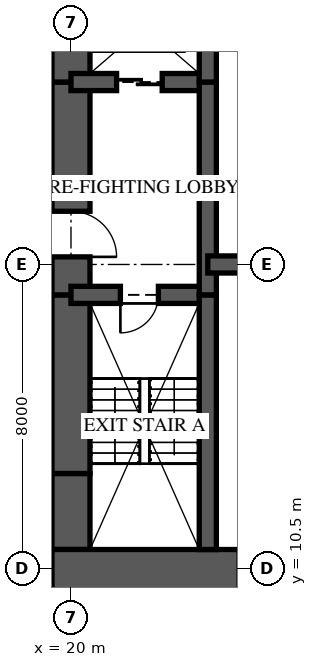
"""IFC4 building model, lengths in metres.
Left out: names, types, materials, properties, quantities, classifications, styles, units other than length and angle.
Written with IfcOpenShell. Run it as: python <this file> out.ifc"""

import sys

from ifc_helpers import new_model, si_unit, direction, frame, frame_2d, origin, place, context, subcontext, project, spatial, rectangle, extrude, element, fill, save


model = new_model("IFC4")
c1 = context("Model", 3, precision=1e-05, world=origin(), true_north=direction((0.0, 1.0)))
c2 = subcontext(c1, "Body", "Model", "MODEL_VIEW")
j1 = project(units=[si_unit("LENGTHUNIT", "METRE"), si_unit("PLANEANGLEUNIT", "RADIAN")], contexts=[c1])
p1 = place(None, origin())
s1 = spatial("IfcSite", under=j1, at=p1, CompositionType="ELEMENT")
p2 = place(p1, origin())
s2 = spatial("IfcBuilding", under=s1, at=p2, CompositionType="ELEMENT")
p3 = place(p2, frame((0.0, 0.0, 16.0)))
s3 = spatial("IfcBuildingStorey", under=s2, at=p3, CompositionType="ELEMENT", Elevation=16.0)
p4 = place(p3, frame((19.5, 10.125, 0.0), z_axis=(0.0, 0.0, 1.0), x_axis=(1.0, 0.0, 0.0)))
e1 = element("IfcWall", 1, at=p4, inside=s3, PredefinedType="SHEAR", context=c2, shape_type="SweptSolid", body=[
    extrude(rectangle(XDim=6.5, YDim=1.75, at=frame_2d((3.25, 0.0))), origin(), (0.0, 0.0, 1.0), 5.0),
])
p5 = place(p4, frame((4.925, 0.0, 0.0)))
e2 = element("IfcOpeningElement", 2, at=p5, cuts=e1, PredefinedType="OPENING", context=c2, shape_type="SweptSolid", body=[
    extrude(rectangle(XDim=0.75, YDim=2.1, at=frame_2d((0.375, 1.05))), frame((0.0, 0.885, 0.0), z_axis=(0.0, -1.0, 0.0), x_axis=(1.0, 0.0, 0.0)), (0.0, 0.0, 1.0), 1.77),
])
p6 = place(p3, frame((20.0, 26.0, 0.0), z_axis=(0.0, 0.0, 1.0), x_axis=(0.0, -1.0, 0.0)))
e3 = element("IfcWall", 3, at=p6, inside=s3, PredefinedType="SHEAR", context=c2, shape_type="SweptSolid", body=[
    extrude(rectangle(XDim=2.7, YDim=1.0, at=frame_2d((1.35, 0.0))), origin(), (0.0, 0.0, 1.0), 5.0),
])
p7 = place(p3, frame((20.0, 23.3, 0.0), z_axis=(0.0, 0.0, 1.0), x_axis=(0.0, -1.0, 0.0)))
e4 = element("IfcWall", 4, at=p7, inside=s3, PredefinedType="SHEAR", context=c2, shape_type="SweptSolid", body=[
    extrude(rectangle(XDim=5.6, YDim=1.0, at=frame_2d((2.8, 0.0))), origin(), (0.0, 0.0, 1.0), 5.0),
])
p8 = place(p7, frame((3.4, 0.0, 0.0)))
e5 = element("IfcOpeningElement", 5, at=p8, cuts=e4, PredefinedType="OPENING", context=c2, shape_type="SweptSolid", body=[
    extrude(rectangle(XDim=1.2, YDim=2.2, at=frame_2d((0.6, 1.1))), frame((0.0, 0.51, 0.0), z_axis=(0.0, -1.0, 0.0), x_axis=(1.0, 0.0, 0.0)), (0.0, 0.0, 1.0), 1.02),
])
p9 = place(p3, frame((20.0, 17.7, 0.0), z_axis=(0.0, 0.0, 1.0), x_axis=(0.0, -1.0, 0.0)))
e6 = element("IfcWall", 6, at=p9, inside=s3, PredefinedType="SHEAR", context=c2, shape_type="SweptSolid", body=[
    extrude(rectangle(XDim=4.7, YDim=1.0, at=frame_2d((2.35, 0.0))), origin(), (0.0, 0.0, 1.0), 5.0),
])
p10 = place(p3, frame((20.0, 13.0, 0.0), z_axis=(0.0, 0.0, 1.0), x_axis=(0.0, -1.0, 0.0)))
e7 = element("IfcWall", 7, at=p10, inside=s3, PredefinedType="SHEAR", context=c2, shape_type="SweptSolid", body=[
    extrude(rectangle(XDim=2.0, YDim=1.0, at=frame_2d((1.0, 0.0))), origin(), (0.0, 0.0, 1.0), 5.0),
])
p11 = place(p3, frame((23.6, 11.0, 0.0), z_axis=(0.0, 0.0, 1.0), x_axis=(0.0, 1.0, 0.0)))
e8 = element("IfcWall", 8, at=p11, inside=s3, PredefinedType="SHEAR", context=c2, shape_type="SweptSolid", body=[
    extrude(rectangle(XDim=6.7, YDim=0.45, at=frame_2d((3.35, 0.0))), origin(), (0.0, 0.0, 1.0), 5.0),
])
p12 = place(p3, frame((23.6, 17.7, 0.0), z_axis=(0.0, 0.0, 1.0), x_axis=(0.0, 1.0, 0.0)))
e9 = element("IfcWall", 9, at=p12, inside=s3, PredefinedType="SHEAR", context=c2, shape_type="SweptSolid", body=[
    extrude(rectangle(XDim=5.6, YDim=0.45, at=frame_2d((2.8, 0.0))), origin(), (0.0, 0.0, 1.0), 5.0),
])
p13 = place(p3, frame((23.6, 23.3, 0.0), z_axis=(0.0, 0.0, 1.0), x_axis=(0.0, 1.0, 0.0)))
e10 = element("IfcWall", 10, at=p13, inside=s3, PredefinedType="SHEAR", context=c2, shape_type="SweptSolid", body=[
    extrude(rectangle(XDim=2.7, YDim=0.45, at=frame_2d((1.35, 0.0))), origin(), (0.0, 0.0, 1.0), 5.0),
])
p14 = place(p3, frame((20.0, 17.7, 0.0), z_axis=(0.0, 0.0, 1.0), x_axis=(1.0, 0.0, 0.0)))
e11 = element("IfcWall", 11, at=p14, inside=s3, PredefinedType="SHEAR", context=c2, shape_type="SweptSolid", body=[
    extrude(rectangle(XDim=3.6, YDim=0.45, at=frame_2d((1.8, 0.0))), origin(), (0.0, 0.0, 1.0), 5.0),
])
p15 = place(p14, frame((1.3, 0.0, 0.0)))
e12 = element("IfcOpeningElement", 12, at=p15, cuts=e11, PredefinedType="OPENING", context=c2, shape_type="SweptSolid", body=[
    extrude(rectangle(XDim=1.0, YDim=2.1, at=frame_2d((0.5, 1.05))), frame((0.0, 0.235, 0.0), z_axis=(0.0, -1.0, 0.0), x_axis=(1.0, 0.0, 0.0)), (0.0, 0.0, 1.0), 0.47),
])
p16 = place(p3, frame((20.0, 23.3, 0.0), z_axis=(0.0, 0.0, 1.0), x_axis=(1.0, 0.0, 0.0)))
e13 = element("IfcWall", 13, at=p16, inside=s3, PredefinedType="SHEAR", context=c2, shape_type="SweptSolid", body=[
    extrude(rectangle(XDim=3.6, YDim=0.45, at=frame_2d((1.8, 0.0))), origin(), (0.0, 0.0, 1.0), 5.0),
])
p17 = place(p16, frame((1.2, 0.0, 0.0)))
e14 = element("IfcOpeningElement", 14, at=p17, cuts=e13, PredefinedType="OPENING", context=c2, shape_type="SweptSolid", body=[
    extrude(rectangle(XDim=1.2, YDim=2.1, at=frame_2d((0.6, 1.05))), frame((0.0, 0.235, 0.0), z_axis=(0.0, -1.0, 0.0), x_axis=(1.0, 0.0, 0.0)), (0.0, 0.0, 1.0), 0.47),
])
p18 = place(p3, frame((23.6, 18.5, 0.0), z_axis=(0.0, 0.0, 1.0), x_axis=(1.0, 0.0, 0.0)))
e15 = element("IfcWall", 15, at=p18, inside=s3, PredefinedType="SHEAR", context=c2, shape_type="SweptSolid", body=[
    extrude(rectangle(XDim=2.4, YDim=0.45, at=frame_2d((1.2, 0.0))), origin(), (0.0, 0.0, 1.0), 5.0),
])
p19 = place(p15, frame((1.0, 0.0, 0.0), z_axis=(0.0, 0.0, 1.0), x_axis=(-1.0, 0.0, 0.0)))
e16 = element("IfcDoor", 16, at=p19, inside=s3, OperationType="SINGLE_SWING_RIGHT", PredefinedType="DOOR", context=c2, shape_type="SweptSolid", body=[
    extrude(rectangle(XDim=1.0, YDim=2.1, at=frame_2d((0.5, 1.05))), frame((0.0, 0.025, 0.0), z_axis=(0.0, -1.0, 0.0), x_axis=(1.0, 0.0, 0.0)), (0.0, 0.0, 1.0), 0.05),
])
fill(e12, e16)
p20 = place(p8, origin())
e17 = element("IfcDoor", 17, at=p20, inside=s3, OperationType="SINGLE_SWING_RIGHT", PredefinedType="DOOR", context=c2, shape_type="SweptSolid", body=[
    extrude(rectangle(XDim=1.2, YDim=2.2, at=frame_2d((0.6, 1.1))), frame((0.0, 0.025, 0.0), z_axis=(0.0, -1.0, 0.0), x_axis=(1.0, 0.0, 0.0)), (0.0, 0.0, 1.0), 0.05),
])
fill(e5, e17)
p21 = place(p17, origin())
e18 = element("IfcDoor", 18, at=p21, inside=s3, OperationType="SLIDING_TO_LEFT", PredefinedType="DOOR", context=c2, shape_type="SweptSolid", body=[
    extrude(rectangle(XDim=1.2, YDim=2.1, at=frame_2d((0.6, 1.05))), frame((0.0, 0.025, 0.0), z_axis=(0.0, -1.0, 0.0), x_axis=(1.0, 0.0, 0.0)), (0.0, 0.0, 1.0), 0.05),
])
fill(e14, e18)
save(model, sys.argv[1])
